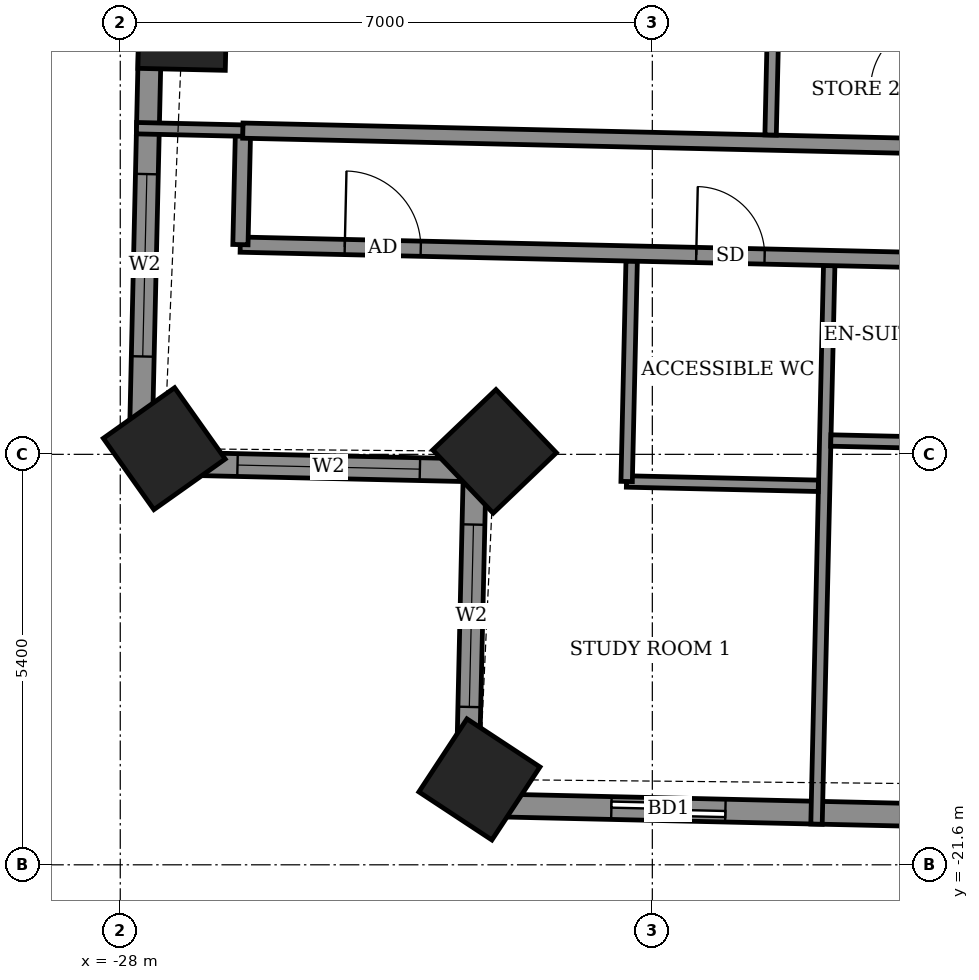
"""IFC4 building model, lengths in metres.
Left out: names, types, materials, properties, quantities, classifications, styles, units other than length and angle.
Written with IfcOpenShell. Run it as: python <this file> out.ifc"""

import sys

from ifc_helpers import new_model, si_unit, direction, frame, frame_2d, origin, origin_2d, place, context, subcontext, project, spatial, rectangle, extrude, element, fill, save


model = new_model("IFC4")
c1 = context("Model", 3, precision=1e-05, world=origin(), true_north=direction((0.0, 1.0)))
c2 = subcontext(c1, "Body", "Model", "MODEL_VIEW")
j1 = project(units=[si_unit("LENGTHUNIT", "METRE"), si_unit("PLANEANGLEUNIT", "RADIAN")], contexts=[c1])
p1 = place(None, origin())
s1 = spatial("IfcSite", under=j1, at=p1, CompositionType="ELEMENT")
p2 = place(p1, origin())
s2 = spatial("IfcBuilding", under=s1, at=p2, CompositionType="ELEMENT")
p3 = place(p2, frame((0.0, 0.0, 197.9)))
s3 = spatial("IfcBuildingStorey", under=s2, at=p3, CompositionType="ELEMENT", Elevation=197.9)
for number, where, z_axis, x_axis in (
    (1, (-27.18, -10.56, -0.55), (0.0, 0.0, 1.0), (-0.023, -1.0, 0.0)),
    (2, (-27.421, -16.125, -0.55), (0.0, 0.0, 1.0), (0.579, -0.816, 0.0)),
    (3, (-23.075, -16.161, -0.55), (0.0, 0.0, 1.0), (0.691, -0.723, 0.0)),
    (4, (-23.275, -20.477, -0.55), (0.0, 0.0, 1.0), (0.835, -0.55, 0.0)),
):
    element("IfcColumn", number, at=place(p3, frame(where, z_axis=z_axis, x_axis=x_axis)), inside=s3, PredefinedType="COLUMN", context=c2, shape_type="SweptSolid", body=[
        extrude(rectangle(XDim=1.15, YDim=1.15, at=origin_2d()), origin(), (0.0, 0.0, 1.0), 3.6),
    ])
p4 = place(p3, frame((-27.47, -4.585, 0.0), z_axis=(0.0, 0.0, 1.0), x_axis=(-0.022686419344, -0.999742630069, 0.0)))
e5 = element("IfcWall", 5, at=p4, inside=s3, PredefinedType="SOLIDWALL", context=c2, shape_type="SweptSolid", body=[
    extrude(rectangle(XDim=11.73, YDim=0.3, at=frame_2d((5.865, 0.0))), origin(), (0.0, 0.0, 1.0), 2.55),
])
p5 = place(p4, frame((2.261, 0.0, 0.0)))
e6 = element("IfcOpeningElement", 6, at=p5, cuts=e5, PredefinedType="OPENING", context=c2, shape_type="SweptSolid", body=[
    extrude(rectangle(XDim=1.5, YDim=2.4, at=frame_2d((0.75, 1.2))), frame((0.0, 0.16, 0.0), z_axis=(0.0, -1.0, 0.0), x_axis=(1.0, 0.0, 0.0)), (0.0, 0.0, 1.0), 0.32),
])
p6 = place(p4, frame((7.93, 0.0, 0.9)))
e7 = element("IfcOpeningElement", 7, at=p6, cuts=e5, PredefinedType="OPENING", context=c2, shape_type="SweptSolid", body=[
    extrude(rectangle(XDim=2.4, YDim=1.5, at=frame_2d((1.2, 0.75))), frame((0.0, 0.16, 0.0), z_axis=(0.0, -1.0, 0.0), x_axis=(1.0, 0.0, 0.0)), (0.0, 0.0, 1.0), 0.32),
])
p7 = place(p3, frame((-27.736, -16.312, 0.0), z_axis=(0.0, 0.0, 1.0), x_axis=(0.999747504193, -0.022470599878, 0.0)))
e8 = element("IfcWall", 8, at=p7, inside=s3, PredefinedType="SOLIDWALL", context=c2, shape_type="SweptSolid", body=[
    extrude(rectangle(XDim=4.4, YDim=0.3, at=frame_2d((2.2, 0.0))), origin(), (0.0, 0.0, 1.0), 2.55),
])
p8 = place(p7, frame((1.279, 0.0, 0.9)))
e9 = element("IfcOpeningElement", 9, at=p8, cuts=e8, PredefinedType="OPENING", context=c2, shape_type="SweptSolid", body=[
    extrude(rectangle(XDim=2.4, YDim=1.5, at=frame_2d((1.2, 0.75))), frame((0.0, 0.16, 0.0), z_axis=(0.0, -1.0, 0.0), x_axis=(1.0, 0.0, 0.0)), (0.0, 0.0, 1.0), 0.32),
])
p9 = place(p3, frame((-23.337, -16.411, 0.0), z_axis=(0.0, 0.0, 1.0), x_axis=(-0.022747872013, -0.999741233679, 0.0)))
e10 = element("IfcWall", 10, at=p9, inside=s3, PredefinedType="SOLIDWALL", context=c2, shape_type="SweptSolid", body=[
    extrude(rectangle(XDim=4.4, YDim=0.3, at=frame_2d((2.2, 0.0))), origin(), (0.0, 0.0, 1.0), 2.55),
])
p10 = place(p9, frame((0.713, 0.0, 0.9)))
e11 = element("IfcOpeningElement", 11, at=p10, cuts=e10, PredefinedType="OPENING", context=c2, shape_type="SweptSolid", body=[
    extrude(rectangle(XDim=2.4, YDim=1.5, at=frame_2d((1.2, 0.75))), frame((0.0, 0.16, 0.0), z_axis=(0.0, -1.0, 0.0), x_axis=(1.0, 0.0, 0.0)), (0.0, 0.0, 1.0), 0.32),
])
p11 = place(p3, frame((-23.437, -20.81, 0.0), z_axis=(0.0, 0.0, 1.0), x_axis=(0.999742269115, -0.022702320244, 0.0)))
e12 = element("IfcWall", 12, at=p11, inside=s3, PredefinedType="SOLIDWALL", context=c2, shape_type="SweptSolid", body=[
    extrude(rectangle(XDim=41.844, YDim=0.3, at=frame_2d((20.922, 0.0))), origin(), (0.0, 0.0, 1.0), 2.55),
])
p12 = place(p11, frame((1.899, 0.0, 0.0)))
e13 = element("IfcOpeningElement", 13, at=p12, cuts=e12, PredefinedType="OPENING", context=c2, shape_type="SweptSolid", body=[
    extrude(rectangle(XDim=1.5, YDim=2.4, at=frame_2d((0.75, 1.2))), frame((0.0, 0.16, 0.0), z_axis=(0.0, -1.0, 0.0), x_axis=(1.0, 0.0, 0.0)), (0.0, 0.0, 1.0), 0.32),
])
p13 = place(p11, frame((7.575, 0.0, 0.0)))
e14 = element("IfcOpeningElement", 14, at=p13, cuts=e12, PredefinedType="OPENING", context=c2, shape_type="SweptSolid", body=[
    extrude(rectangle(XDim=1.2, YDim=2.4, at=frame_2d((0.6, 1.2))), frame((0.0, 0.16, 0.0), z_axis=(0.0, -1.0, 0.0), x_axis=(1.0, 0.0, 0.0)), (0.0, 0.0, 1.0), 0.32),
])
p14 = place(p11, frame((10.612, 0.0, 0.0)))
e15 = element("IfcOpeningElement", 15, at=p14, cuts=e12, PredefinedType="OPENING", context=c2, shape_type="SweptSolid", body=[
    extrude(rectangle(XDim=1.5, YDim=2.4, at=frame_2d((0.75, 1.2))), frame((0.0, 0.16, 0.0), z_axis=(0.0, -1.0, 0.0), x_axis=(1.0, 0.0, 0.0)), (0.0, 0.0, 1.0), 0.32),
])
p15 = place(p11, frame((15.762, 0.0, 0.0)))
e16 = element("IfcOpeningElement", 16, at=p15, cuts=e12, PredefinedType="OPENING", context=c2, shape_type="SweptSolid", body=[
    extrude(rectangle(XDim=1.5, YDim=2.4, at=frame_2d((0.75, 1.2))), frame((0.0, 0.16, 0.0), z_axis=(0.0, -1.0, 0.0), x_axis=(1.0, 0.0, 0.0)), (0.0, 0.0, 1.0), 0.32),
])
p16 = place(p11, frame((21.648, 0.0, 0.0)))
e17 = element("IfcOpeningElement", 17, at=p16, cuts=e12, PredefinedType="OPENING", context=c2, shape_type="SweptSolid", body=[
    extrude(rectangle(XDim=1.2, YDim=2.4, at=frame_2d((0.6, 1.2))), frame((0.0, 0.16, 0.0), z_axis=(0.0, -1.0, 0.0), x_axis=(1.0, 0.0, 0.0)), (0.0, 0.0, 1.0), 0.32),
])
p17 = place(p11, frame((24.685, 0.0, 0.0)))
e18 = element("IfcOpeningElement", 18, at=p17, cuts=e12, PredefinedType="OPENING", context=c2, shape_type="SweptSolid", body=[
    extrude(rectangle(XDim=1.5, YDim=2.4, at=frame_2d((0.75, 1.2))), frame((0.0, 0.16, 0.0), z_axis=(0.0, -1.0, 0.0), x_axis=(1.0, 0.0, 0.0)), (0.0, 0.0, 1.0), 0.32),
])
p18 = place(p11, frame((29.685, 0.0, 0.0)))
e19 = element("IfcOpeningElement", 19, at=p18, cuts=e12, PredefinedType="OPENING", context=c2, shape_type="SweptSolid", body=[
    extrude(rectangle(XDim=1.5, YDim=2.4, at=frame_2d((0.75, 1.2))), frame((0.0, 0.16, 0.0), z_axis=(0.0, -1.0, 0.0), x_axis=(1.0, 0.0, 0.0)), (0.0, 0.0, 1.0), 0.32),
])
p19 = place(p11, frame((33.022, 0.0, 0.0)))
e20 = element("IfcOpeningElement", 20, at=p19, cuts=e12, PredefinedType="OPENING", context=c2, shape_type="SweptSolid", body=[
    extrude(rectangle(XDim=1.2, YDim=2.4, at=frame_2d((0.6, 1.2))), frame((0.0, 0.16, 0.0), z_axis=(0.0, -1.0, 0.0), x_axis=(1.0, 0.0, 0.0)), (0.0, 0.0, 1.0), 0.32),
])
p20 = place(p11, frame((37.974, 0.0, 0.9)))
e21 = element("IfcOpeningElement", 21, at=p20, cuts=e12, PredefinedType="OPENING", context=c2, shape_type="SweptSolid", body=[
    extrude(rectangle(XDim=2.4, YDim=1.5, at=frame_2d((1.2, 0.75))), frame((0.0, 0.16, 0.0), z_axis=(0.0, -1.0, 0.0), x_axis=(1.0, 0.0, 0.0)), (0.0, 0.0, 1.0), 0.32),
])
p21 = place(p3, frame((-18.84, -21.065, 0.0), z_axis=(0.0, 0.0, 1.0), x_axis=(0.022720650804, 0.999741852694, 0.0)))
e22 = element("IfcWall", 22, at=p21, inside=s3, PredefinedType="PARTITIONING", context=c2, shape_type="SweptSolid", body=[
    extrude(rectangle(XDim=7.35, YDim=0.15, at=frame_2d((3.675, 0.0))), origin(), (0.0, 0.0, 1.0), 2.55),
])
p22 = place(p3, frame((-21.34, -16.557, 0.0), z_axis=(0.0, 0.0, 1.0), x_axis=(0.999743977673, -0.022626955293, 0.0)))
e23 = element("IfcWall", 23, at=p22, inside=s3, PredefinedType="PARTITIONING", context=c2, shape_type="SweptSolid", body=[
    extrude(rectangle(XDim=2.525, YDim=0.15, at=frame_2d((1.262, 0.0))), origin(), (0.0, 0.0, 1.0), 3.05),
])
p23 = place(p3, frame((-21.338, -16.557, 0.0), z_axis=(0.0, 0.0, 1.0), x_axis=(0.022732880677, 0.999741574676, 0.0)))
e24 = element("IfcWall", 24, at=p23, inside=s3, PredefinedType="PARTITIONING", context=c2, shape_type="SweptSolid", body=[
    extrude(rectangle(XDim=2.9, YDim=0.15, at=frame_2d((1.45, 0.0))), origin(), (0.0, 0.0, 1.0), 3.05),
])
p24 = place(p3, frame((-18.652, -16.018, 0.0), z_axis=(0.0, 0.0, 1.0), x_axis=(0.999749797124, -0.022368351553, 0.0)))
e25 = element("IfcWall", 25, at=p24, inside=s3, PredefinedType="PARTITIONING", context=c2, shape_type="SweptSolid", body=[
    extrude(rectangle(XDim=2.325, YDim=0.15, at=frame_2d((1.162, 0.0))), origin(), (0.0, 0.0, 1.0), 3.05),
])
p25 = place(p3, frame((-26.421, -13.441, 0.0), z_axis=(0.0, 0.0, 1.0), x_axis=(0.999742754064, -0.022680954485, 0.0)))
e26 = element("IfcWall", 26, at=p25, inside=s3, PredefinedType="PARTITIONING", context=c2, shape_type="SweptSolid", body=[
    extrude(rectangle(XDim=48.945, YDim=0.2, at=frame_2d((24.472, 0.0))), origin(), (0.0, 0.0, 1.0), 3.05),
])
p26 = place(p25, frame((1.375, 0.0, 0.0)))
e27 = element("IfcOpeningElement", 27, at=p26, cuts=e26, PredefinedType="OPENING", context=c2, shape_type="SweptSolid", body=[
    extrude(rectangle(XDim=1.0, YDim=2.1, at=frame_2d((0.5, 1.05))), frame((0.0, 0.11, 0.0), z_axis=(0.0, -1.0, 0.0), x_axis=(1.0, 0.0, 0.0)), (0.0, 0.0, 1.0), 0.22),
])
p27 = place(p25, frame((6.0, 0.0, 0.0)))
e28 = element("IfcOpeningElement", 28, at=p27, cuts=e26, PredefinedType="OPENING", context=c2, shape_type="SweptSolid", body=[
    extrude(rectangle(XDim=0.9, YDim=2.1, at=frame_2d((0.45, 1.05))), frame((0.0, 0.11, 0.0), z_axis=(0.0, -1.0, 0.0), x_axis=(1.0, 0.0, 0.0)), (0.0, 0.0, 1.0), 0.22),
])
p28 = place(p25, frame((10.775, 0.0, 0.0)))
e29 = element("IfcOpeningElement", 29, at=p28, cuts=e26, PredefinedType="OPENING", context=c2, shape_type="SweptSolid", body=[
    extrude(rectangle(XDim=0.9, YDim=2.1, at=frame_2d((0.45, 1.05))), frame((0.0, 0.11, 0.0), z_axis=(0.0, -1.0, 0.0), x_axis=(1.0, 0.0, 0.0)), (0.0, 0.0, 1.0), 0.22),
])
p29 = place(p25, frame((13.05, 0.0, 0.0)))
e30 = element("IfcOpeningElement", 30, at=p29, cuts=e26, PredefinedType="OPENING", context=c2, shape_type="SweptSolid", body=[
    extrude(rectangle(XDim=0.9, YDim=2.1, at=frame_2d((0.45, 1.05))), frame((0.0, 0.11, 0.0), z_axis=(0.0, -1.0, 0.0), x_axis=(1.0, 0.0, 0.0)), (0.0, 0.0, 1.0), 0.22),
])
p30 = place(p25, frame((20.275, 0.0, 0.0)))
e31 = element("IfcOpeningElement", 31, at=p30, cuts=e26, PredefinedType="OPENING", context=c2, shape_type="SweptSolid", body=[
    extrude(rectangle(XDim=0.9, YDim=2.1, at=frame_2d((0.45, 1.05))), frame((0.0, 0.11, 0.0), z_axis=(0.0, -1.0, 0.0), x_axis=(1.0, 0.0, 0.0)), (0.0, 0.0, 1.0), 0.22),
])
p31 = place(p25, frame((22.525, 0.0, 0.0)))
e32 = element("IfcOpeningElement", 32, at=p31, cuts=e26, PredefinedType="OPENING", context=c2, shape_type="SweptSolid", body=[
    extrude(rectangle(XDim=0.9, YDim=2.1, at=frame_2d((0.45, 1.05))), frame((0.0, 0.11, 0.0), z_axis=(0.0, -1.0, 0.0), x_axis=(1.0, 0.0, 0.0)), (0.0, 0.0, 1.0), 0.22),
])
p32 = place(p25, frame((29.6, 0.0, 0.0)))
e33 = element("IfcOpeningElement", 33, at=p32, cuts=e26, PredefinedType="OPENING", context=c2, shape_type="SweptSolid", body=[
    extrude(rectangle(XDim=0.9, YDim=2.1, at=frame_2d((0.45, 1.05))), frame((0.0, 0.11, 0.0), z_axis=(0.0, -1.0, 0.0), x_axis=(1.0, 0.0, 0.0)), (0.0, 0.0, 1.0), 0.22),
])
p33 = place(p25, frame((31.875, 0.0, 0.0)))
e34 = element("IfcOpeningElement", 34, at=p33, cuts=e26, PredefinedType="OPENING", context=c2, shape_type="SweptSolid", body=[
    extrude(rectangle(XDim=0.9, YDim=2.1, at=frame_2d((0.45, 1.05))), frame((0.0, 0.11, 0.0), z_axis=(0.0, -1.0, 0.0), x_axis=(1.0, 0.0, 0.0)), (0.0, 0.0, 1.0), 0.22),
])
p34 = place(p25, frame((38.85, 0.0, 0.0)))
e35 = element("IfcOpeningElement", 35, at=p34, cuts=e26, PredefinedType="OPENING", context=c2, shape_type="SweptSolid", body=[
    extrude(rectangle(XDim=0.9, YDim=2.1, at=frame_2d((0.45, 1.05))), frame((0.0, 0.11, 0.0), z_axis=(0.0, -1.0, 0.0), x_axis=(1.0, 0.0, 0.0)), (0.0, 0.0, 1.0), 0.22),
])
p35 = place(p25, frame((46.097, 0.0, 0.0)))
e36 = element("IfcOpeningElement", 36, at=p35, cuts=e26, PredefinedType="OPENING", context=c2, shape_type="SweptSolid", body=[
    extrude(rectangle(XDim=1.0, YDim=2.1, at=frame_2d((0.5, 1.05))), frame((0.0, 0.11, 0.0), z_axis=(0.0, -1.0, 0.0), x_axis=(1.0, 0.0, 0.0)), (0.0, 0.0, 1.0), 0.22),
])
p36 = place(p25, frame((41.2, 0.0, 0.0)))
e37 = element("IfcOpeningElement", 37, at=p36, cuts=e26, PredefinedType="OPENING", context=c2, shape_type="SweptSolid", body=[
    extrude(rectangle(XDim=0.9, YDim=2.1, at=frame_2d((0.45, 1.05))), frame((0.0, 0.11, 0.0), z_axis=(0.0, -1.0, 0.0), x_axis=(1.0, 0.0, 0.0)), (0.0, 0.0, 1.0), 0.22),
])
p37 = place(p3, frame((-26.419, -13.441, 0.0), z_axis=(0.0, 0.0, 1.0), x_axis=(0.022617910375, 0.999744182344, 0.0)))
e38 = element("IfcWall", 38, at=p37, inside=s3, PredefinedType="PARTITIONING", context=c2, shape_type="SweptSolid", body=[
    extrude(rectangle(XDim=1.5, YDim=0.2, at=frame_2d((0.75, 0.0))), origin(), (0.0, 0.0, 1.0), 3.05),
])
p38 = place(p3, frame((-27.786, -11.909, 0.0), z_axis=(0.0, 0.0, 1.0), x_axis=(0.999740216184, -0.022792545827, 0.0)))
e39 = element("IfcWall", 39, at=p38, inside=s3, PredefinedType="PARTITIONING", context=c2, shape_type="SweptSolid", body=[
    extrude(rectangle(XDim=1.403, YDim=0.15, at=frame_2d((0.702, 0.0))), origin(), (0.0, 0.0, 1.0), 2.55),
])
p39 = place(p3, frame((-26.387, -11.941, 0.0), z_axis=(0.0, 0.0, 1.0), x_axis=(0.999741076645, -0.022754772455, 0.0)))
e40 = element("IfcWall", 40, at=p39, inside=s3, PredefinedType="PARTITIONING", context=c2, shape_type="SweptSolid", body=[
    extrude(rectangle(XDim=9.141, YDim=0.2, at=frame_2d((4.571, 0.0))), origin(), (0.0, 0.0, 1.0), 3.05),
])
p40 = place(p3, frame((-19.444, -11.999, 0.0), z_axis=(0.0, 0.0, 1.0), x_axis=(0.022603288534, 0.999744513037, 0.0)))
e41 = element("IfcWall", 41, at=p40, inside=s3, PredefinedType="PARTITIONING", context=c2, shape_type="SweptSolid", body=[
    extrude(rectangle(XDim=2.301, YDim=0.15, at=frame_2d((1.15, 0.0))), origin(), (0.0, 0.0, 1.0), 3.05),
])
p41 = place(p6, origin())
e42 = element("IfcWindow", 42, at=p41, inside=s3, PartitioningType="DOUBLE_PANEL_VERTICAL", PredefinedType="WINDOW", context=c2, shape_type="SweptSolid", body=[
    extrude(rectangle(XDim=2.4, YDim=1.5, at=frame_2d((1.2, 0.75))), frame((0.0, 0.03, 0.0), z_axis=(0.0, -1.0, 0.0), x_axis=(1.0, 0.0, 0.0)), (0.0, 0.0, 1.0), 0.06),
])
fill(e7, e42)
p42 = place(p8, origin())
e43 = element("IfcWindow", 43, at=p42, inside=s3, PartitioningType="DOUBLE_PANEL_VERTICAL", PredefinedType="WINDOW", context=c2, shape_type="SweptSolid", body=[
    extrude(rectangle(XDim=2.4, YDim=1.5, at=frame_2d((1.2, 0.75))), frame((0.0, 0.03, 0.0), z_axis=(0.0, -1.0, 0.0), x_axis=(1.0, 0.0, 0.0)), (0.0, 0.0, 1.0), 0.06),
])
fill(e9, e43)
p43 = place(p10, origin())
e44 = element("IfcWindow", 44, at=p43, inside=s3, PartitioningType="DOUBLE_PANEL_VERTICAL", PredefinedType="WINDOW", context=c2, shape_type="SweptSolid", body=[
    extrude(rectangle(XDim=2.4, YDim=1.5, at=frame_2d((1.2, 0.75))), frame((0.0, 0.03, 0.0), z_axis=(0.0, -1.0, 0.0), x_axis=(1.0, 0.0, 0.0)), (0.0, 0.0, 1.0), 0.06),
])
fill(e11, e44)
p44 = place(p12, origin())
e45 = element("IfcDoor", 45, at=p44, inside=s3, OperationType="SLIDING_TO_LEFT", PredefinedType="DOOR", context=c2, shape_type="SweptSolid", body=[
    extrude(rectangle(XDim=1.5, YDim=2.4, at=frame_2d((0.75, 1.2))), frame((0.0, 0.025, 0.0), z_axis=(0.0, -1.0, 0.0), x_axis=(1.0, 0.0, 0.0)), (0.0, 0.0, 1.0), 0.05),
])
fill(e13, e45)
p45 = place(p26, origin())
e46 = element("IfcDoor", 46, at=p45, inside=s3, OperationType="SINGLE_SWING_LEFT", PredefinedType="DOOR", context=c2, shape_type="SweptSolid", body=[
    extrude(rectangle(XDim=1.0, YDim=2.1, at=frame_2d((0.5, 1.05))), frame((0.0, 0.025, 0.0), z_axis=(0.0, -1.0, 0.0), x_axis=(1.0, 0.0, 0.0)), (0.0, 0.0, 1.0), 0.05),
])
fill(e27, e46)
p46 = place(p27, origin())
e47 = element("IfcDoor", 47, at=p46, inside=s3, OperationType="SINGLE_SWING_LEFT", PredefinedType="DOOR", context=c2, shape_type="SweptSolid", body=[
    extrude(rectangle(XDim=0.9, YDim=2.1, at=frame_2d((0.45, 1.05))), frame((0.0, 0.025, 0.0), z_axis=(0.0, -1.0, 0.0), x_axis=(1.0, 0.0, 0.0)), (0.0, 0.0, 1.0), 0.05),
])
fill(e28, e47)
save(model, sys.argv[1])
